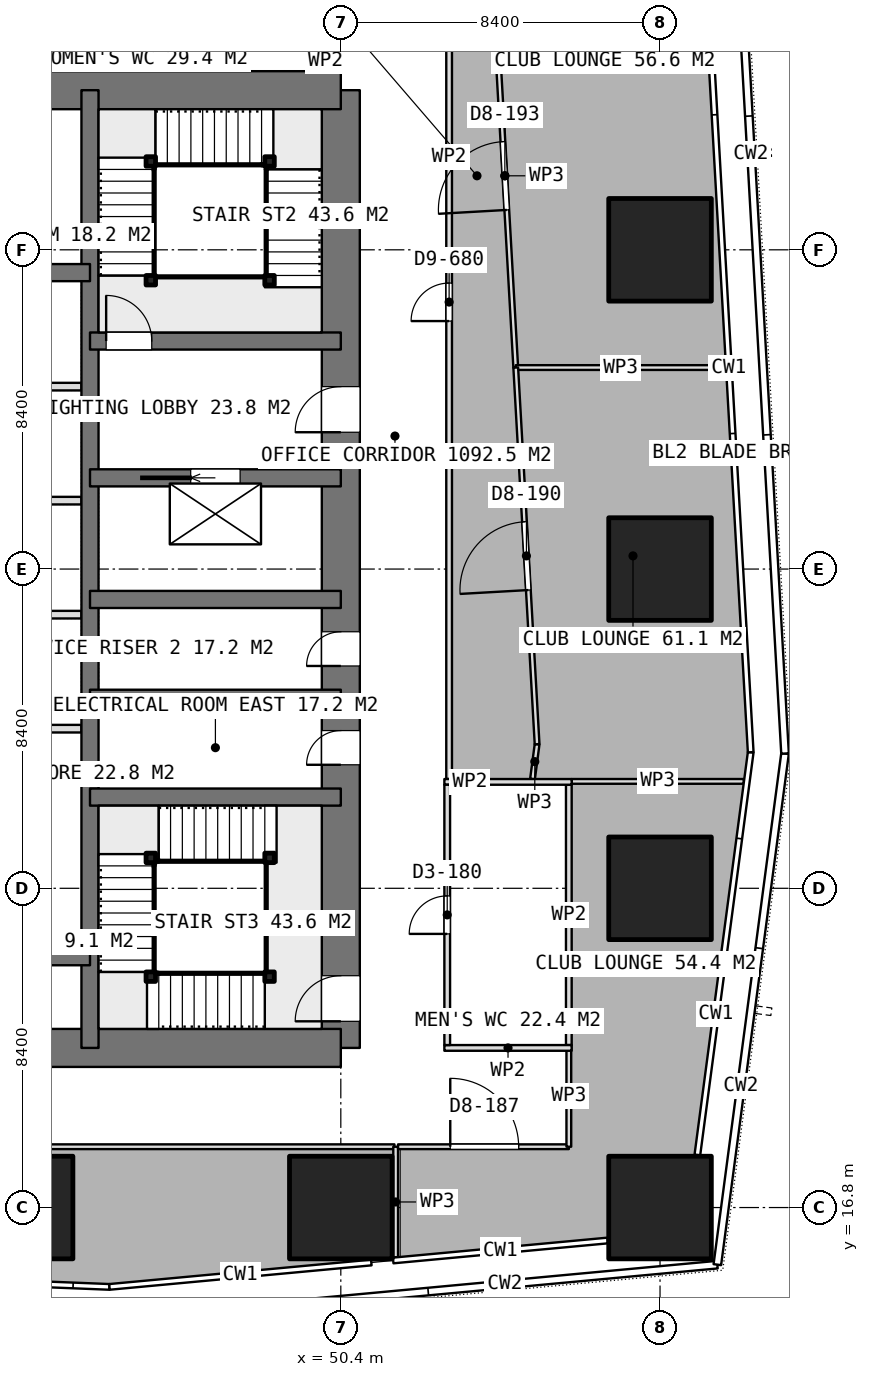
"""IFC4 building model, lengths in metres.
Left out: names, types, materials, properties, quantities, classifications, styles, units other than length and angle.
Written with IfcOpenShell. Run it as: python <this file> out.ifc"""

import sys

from ifc_helpers import new_model, si_unit, direction, frame, frame_2d, origin, origin_2d, place, context, subcontext, project, spatial, rectangle, extrude, element, fill, save


model = new_model("IFC4")
c1 = context("Model", 3, precision=1e-05, world=origin(), true_north=direction((0.0, 1.0)))
c2 = subcontext(c1, "Body", "Model", "MODEL_VIEW")
j1 = project(units=[si_unit("LENGTHUNIT", "METRE"), si_unit("PLANEANGLEUNIT", "RADIAN")], contexts=[c1])
p1 = place(None, origin())
s1 = spatial("IfcSite", under=j1, at=p1, CompositionType="ELEMENT")
p2 = place(p1, origin())
s2 = spatial("IfcBuilding", under=s1, at=p2, CompositionType="ELEMENT")
p3 = place(p2, frame((0.0, 0.0, 172.7)))
s3 = spatial("IfcBuildingStorey", under=s2, at=p3, CompositionType="ELEMENT", Elevation=172.7)
for number, where, z_axis, x_axis in (
    (1, (40.0, 21.0, 0.0), (0.0, 0.0, 1.0), (1.0, 0.0, 0.0)),
    (2, (40.0, 46.2, 0.0), (0.0, 0.0, 1.0), (1.0, 0.0, 0.0)),
):
    element("IfcWall", number, at=place(p3, frame(where, z_axis=z_axis, x_axis=x_axis)), inside=s3, PredefinedType="SHEAR", context=c2, shape_type="SweptSolid", body=[
        extrude(rectangle(XDim=10.4, YDim=1.0, at=frame_2d((5.2, 0.0))), origin(), (0.0, 0.0, 1.0), 3.75),
    ])
p4 = place(p3, frame((50.4, 21.0, 0.0), z_axis=(0.0, 0.0, 1.0), x_axis=(0.0, 1.0, 0.0)))
e3 = element("IfcWall", 3, at=p4, inside=s3, PredefinedType="SHEAR", context=c2, shape_type="SweptSolid", body=[
    extrude(rectangle(XDim=25.2, YDim=1.0, at=frame_2d((12.6, 0.0))), origin(), (0.0, 0.0, 1.0), 3.75),
])
p5 = place(p4, frame((16.2, 0.0, 0.0)))
e4 = element("IfcOpeningElement", 4, at=p5, cuts=e3, PredefinedType="OPENING", context=c2, shape_type="SweptSolid", body=[
    extrude(rectangle(XDim=1.2, YDim=2.1, at=frame_2d((0.6, 1.05))), frame((0.0, 0.51, 0.0), z_axis=(0.0, -1.0, 0.0), x_axis=(1.0, 0.0, 0.0)), (0.0, 0.0, 1.0), 1.02),
])
p6 = place(p4, frame((10.05, 0.0, 0.0)))
e5 = element("IfcOpeningElement", 5, at=p6, cuts=e3, PredefinedType="OPENING", context=c2, shape_type="SweptSolid", body=[
    extrude(rectangle(XDim=0.9, YDim=2.1, at=frame_2d((0.45, 1.05))), frame((0.0, 0.51, 0.0), z_axis=(0.0, -1.0, 0.0), x_axis=(1.0, 0.0, 0.0)), (0.0, 0.0, 1.0), 1.02),
])
p7 = place(p4, frame((7.45, 0.0, 0.0)))
e6 = element("IfcOpeningElement", 6, at=p7, cuts=e3, PredefinedType="OPENING", context=c2, shape_type="SweptSolid", body=[
    extrude(rectangle(XDim=0.9, YDim=2.1, at=frame_2d((0.45, 1.05))), frame((0.0, 0.51, 0.0), z_axis=(0.0, -1.0, 0.0), x_axis=(1.0, 0.0, 0.0)), (0.0, 0.0, 1.0), 1.02),
])
p8 = place(p4, frame((0.7, 0.0, 0.0)))
e7 = element("IfcOpeningElement", 7, at=p8, cuts=e3, PredefinedType="OPENING", context=c2, shape_type="SweptSolid", body=[
    extrude(rectangle(XDim=1.2, YDim=2.1, at=frame_2d((0.6, 1.05))), frame((0.0, 0.51, 0.0), z_axis=(0.0, -1.0, 0.0), x_axis=(1.0, 0.0, 0.0)), (0.0, 0.0, 1.0), 1.02),
])
p9 = place(p3, frame((43.8, 21.0, 0.0), z_axis=(0.0, 0.0, 1.0), x_axis=(0.0, 1.0, 0.0)))
e8 = element("IfcWall", 8, at=p9, inside=s3, PredefinedType="SHEAR", context=c2, shape_type="SweptSolid", body=[
    extrude(rectangle(XDim=25.2, YDim=0.45, at=frame_2d((12.6, 0.0))), origin(), (0.0, 0.0, 1.0), 3.75),
])
for number, where, z_axis, x_axis in (
    (9, (40.0, 23.4, 0.0), (0.0, 0.0, 1.0), (1.0, 0.0, 0.0)),
    (10, (40.0, 41.4, 0.0), (0.0, 0.0, 1.0), (1.0, 0.0, 0.0)),
):
    element("IfcWall", number, at=place(p3, frame(where, z_axis=z_axis, x_axis=x_axis)), inside=s3, PredefinedType="SHEAR", context=c2, shape_type="SweptSolid", body=[
        extrude(rectangle(XDim=3.8, YDim=0.45, at=frame_2d((1.9, 0.0))), origin(), (0.0, 0.0, 1.0), 3.75),
    ])
for number, where, z_axis, x_axis in (
    (11, (43.8, 27.6, 0.0), (0.0, 0.0, 1.0), (1.0, 0.0, 0.0)),
    (12, (43.8, 30.2, 0.0), (0.0, 0.0, 1.0), (1.0, 0.0, 0.0)),
    (13, (43.8, 32.8, 0.0), (0.0, 0.0, 1.0), (1.0, 0.0, 0.0)),
):
    element("IfcWall", number, at=place(p3, frame(where, z_axis=z_axis, x_axis=x_axis)), inside=s3, PredefinedType="SHEAR", context=c2, shape_type="SweptSolid", body=[
        extrude(rectangle(XDim=6.6, YDim=0.45, at=frame_2d((3.3, 0.0))), origin(), (0.0, 0.0, 1.0), 3.75),
    ])
p10 = place(p3, frame((43.8, 36.0, 0.0), z_axis=(0.0, 0.0, 1.0), x_axis=(1.0, 0.0, 0.0)))
e14 = element("IfcWall", 14, at=p10, inside=s3, PredefinedType="SHEAR", context=c2, shape_type="SweptSolid", body=[
    extrude(rectangle(XDim=6.6, YDim=0.45, at=frame_2d((3.3, 0.0))), origin(), (0.0, 0.0, 1.0), 3.75),
])
p11 = place(p10, frame((2.65, 0.0, 0.0)))
e15 = element("IfcOpeningElement", 15, at=p11, cuts=e14, PredefinedType="OPENING", context=c2, shape_type="SweptSolid", body=[
    extrude(rectangle(XDim=1.3, YDim=2.1, at=frame_2d((0.65, 1.05))), frame((0.0, 0.235, 0.0), z_axis=(0.0, -1.0, 0.0), x_axis=(1.0, 0.0, 0.0)), (0.0, 0.0, 1.0), 0.47),
])
p12 = place(p3, frame((43.8, 39.6, 0.0), z_axis=(0.0, 0.0, 1.0), x_axis=(1.0, 0.0, 0.0)))
e16 = element("IfcWall", 16, at=p12, inside=s3, PredefinedType="SHEAR", context=c2, shape_type="SweptSolid", body=[
    extrude(rectangle(XDim=6.6, YDim=0.45, at=frame_2d((3.3, 0.0))), origin(), (0.0, 0.0, 1.0), 3.75),
])
p13 = place(p12, frame((0.425, 0.0, 0.0)))
e17 = element("IfcOpeningElement", 17, at=p13, cuts=e16, PredefinedType="OPENING", context=c2, shape_type="SweptSolid", body=[
    extrude(rectangle(XDim=1.2, YDim=2.1, at=frame_2d((0.6, 1.05))), frame((0.0, 0.235, 0.0), z_axis=(0.0, -1.0, 0.0), x_axis=(1.0, 0.0, 0.0)), (0.0, 0.0, 1.0), 0.47),
])
for number, where, z_axis, x_axis in (
    (18, (42.0, 16.8, 0.0), (0.0, 0.0, 1.0), (1.0, 0.0, 0.0)),
    (19, (50.4, 16.8, 0.0), (0.0, 0.0, 1.0), (1.0, 0.0, 0.0)),
    (20, (58.8, 16.8, 0.0), (0.0, 0.0, 1.0), (1.0, 0.0, 0.0)),
    (21, (58.8, 25.2, 0.0), (0.0, 0.0, 1.0), (1.0, 0.0, 0.0)),
    (22, (58.8, 33.6, 0.0), (0.0, 0.0, 1.0), (1.0, 0.0, 0.0)),
    (23, (58.8, 42.0, 0.0), (0.0, 0.0, 1.0), (1.0, 0.0, 0.0)),
):
    element("IfcColumn", number, at=place(p3, frame(where, z_axis=z_axis, x_axis=x_axis)), inside=s3, PredefinedType="COLUMN", context=c2, shape_type="SweptSolid", body=[
        extrude(rectangle(XDim=2.7, YDim=2.7, at=origin_2d()), origin(), (0.0, 0.0, 1.0), 3.75),
    ])
for number, where, z_axis, x_axis in (
    (24, (40.5, 29.4, 0.0), (0.0, 0.0, 1.0), (1.0, 0.0, 0.0)),
    (25, (40.5, 32.4, 0.0), (0.0, 0.0, 1.0), (1.0, 0.0, 0.0)),
    (26, (40.5, 35.4, 0.0), (0.0, 0.0, 1.0), (1.0, 0.0, 0.0)),
    (27, (40.5, 38.4, 0.0), (0.0, 0.0, 1.0), (1.0, 0.0, 0.0)),
):
    element("IfcWall", number, at=place(p3, frame(where, z_axis=z_axis, x_axis=x_axis)), inside=s3, PredefinedType="PARTITIONING", context=c2, shape_type="SweptSolid", body=[
        extrude(rectangle(XDim=3.075, YDim=0.2, at=frame_2d((1.538, 0.0))), origin(), (0.0, 0.0, 1.0), 3.5),
    ])
p14 = place(p3, frame((50.0, 46.7, 0.0), z_axis=(0.0, 0.0, 1.0), x_axis=(0.0, 1.0, 0.0)))
e28 = element("IfcWall", 28, at=p14, inside=s3, PredefinedType="PARTITIONING", context=c2, shape_type="SweptSolid", body=[
    extrude(rectangle(XDim=2.625, YDim=0.15, at=frame_2d((1.312, 0.0))), origin(), (0.0, 0.0, 1.0), 3.5),
])
for number, where, z_axis, x_axis in (
    (29, (53.125, 21.0, 0.0), (0.0, 0.0, 1.0), (1.0, 0.0, 0.0)),
    (30, (53.125, 28.0, 0.0), (0.0, 0.0, 1.0), (1.0, 0.0, 0.0)),
):
    element("IfcWall", number, at=place(p3, frame(where, z_axis=z_axis, x_axis=x_axis)), inside=s3, PredefinedType="PARTITIONING", context=c2, shape_type="SweptSolid", body=[
        extrude(rectangle(XDim=3.35, YDim=0.15, at=frame_2d((1.675, 0.0))), origin(), (0.0, 0.0, 1.0), 3.5),
    ])
p15 = place(p3, frame((53.2, 21.075, 0.0), z_axis=(0.0, 0.0, 1.0), x_axis=(0.0, 1.0, 0.0)))
e31 = element("IfcWall", 31, at=p15, inside=s3, PredefinedType="PARTITIONING", context=c2, shape_type="SweptSolid", body=[
    extrude(rectangle(XDim=6.85, YDim=0.15, at=frame_2d((3.425, 0.0))), origin(), (0.0, 0.0, 1.0), 3.5),
])
p16 = place(p15, frame((2.925, 0.0, 0.0)))
e32 = element("IfcOpeningElement", 32, at=p16, cuts=e31, PredefinedType="OPENING", context=c2, shape_type="SweptSolid", body=[
    extrude(rectangle(XDim=1.0, YDim=2.1, at=frame_2d((0.5, 1.05))), frame((0.0, 0.085, 0.0), z_axis=(0.0, -1.0, 0.0), x_axis=(1.0, 0.0, 0.0)), (0.0, 0.0, 1.0), 0.17),
])
p17 = place(p3, frame((56.4, 21.075, 0.0), z_axis=(0.0, 0.0, 1.0), x_axis=(0.0, 1.0, 0.0)))
e33 = element("IfcWall", 33, at=p17, inside=s3, PredefinedType="PARTITIONING", context=c2, shape_type="SweptSolid", body=[
    extrude(rectangle(XDim=6.85, YDim=0.15, at=frame_2d((3.425, 0.0))), origin(), (0.0, 0.0, 1.0), 3.5),
])
p18 = place(p3, frame((23.793, 18.4, 0.0), z_axis=(0.0, 0.0, 1.0), x_axis=(1.0, 0.0, 0.0)))
e34 = element("IfcWall", 34, at=p18, inside=s3, PredefinedType="PARTITIONING", context=c2, shape_type="SweptSolid", body=[
    extrude(rectangle(XDim=28.018, YDim=0.125, at=frame_2d((14.009, 0.0))), origin(), (0.0, 0.0, 1.0), 3.5),
])
p19 = place(p18, frame((13.109, 0.0, 0.0)))
e35 = element("IfcOpeningElement", 35, at=p19, cuts=e34, PredefinedType="OPENING", context=c2, shape_type="SweptSolid", body=[
    extrude(rectangle(XDim=1.8, YDim=2.1, at=frame_2d((0.9, 1.05))), frame((0.0, 0.073, 0.0), z_axis=(0.0, -1.0, 0.0), x_axis=(1.0, 0.0, 0.0)), (0.0, 0.0, 1.0), 0.145),
])
p20 = place(p3, frame((51.843, 18.4, 0.0), z_axis=(0.0, 0.0, 1.0), x_axis=(0.0, -1.0, 0.0)))
e36 = element("IfcWall", 36, at=p20, inside=s3, PredefinedType="PARTITIONING", context=c2, shape_type="SweptSolid", body=[
    extrude(rectangle(XDim=2.907, YDim=0.125, at=frame_2d((1.454, 0.0))), origin(), (0.0, 0.0, 1.0), 3.5),
])
p21 = place(p3, frame((51.906, 18.4, 0.0), z_axis=(0.0, 0.0, 1.0), x_axis=(1.0, 0.0, 0.0)))
e37 = element("IfcWall", 37, at=p21, inside=s3, PredefinedType="PARTITIONING", context=c2, shape_type="SweptSolid", body=[
    extrude(rectangle(XDim=4.494, YDim=0.125, at=frame_2d((2.247, 0.0))), origin(), (0.0, 0.0, 1.0), 3.5),
])
p22 = place(p21, frame((1.374, 0.0, 0.0)))
e38 = element("IfcOpeningElement", 38, at=p22, cuts=e37, PredefinedType="OPENING", context=c2, shape_type="SweptSolid", body=[
    extrude(rectangle(XDim=1.8, YDim=2.1, at=frame_2d((0.9, 1.05))), frame((0.0, 0.073, 0.0), z_axis=(0.0, -1.0, 0.0), x_axis=(1.0, 0.0, 0.0)), (0.0, 0.0, 1.0), 0.145),
])
p23 = place(p3, frame((56.4, 18.4, 0.0), z_axis=(0.0, 0.0, 1.0), x_axis=(0.0, 1.0, 0.0)))
e39 = element("IfcWall", 39, at=p23, inside=s3, PredefinedType="PARTITIONING", context=c2, shape_type="SweptSolid", body=[
    extrude(rectangle(XDim=2.675, YDim=0.125, at=frame_2d((1.337, 0.0))), origin(), (0.0, 0.0, 1.0), 3.5),
])
p24 = place(p3, frame((56.476, 28.013, 0.0), z_axis=(0.0, 0.0, 1.0), x_axis=(1.0, 0.0, 0.0)))
e40 = element("IfcWall", 40, at=p24, inside=s3, PredefinedType="PARTITIONING", context=c2, shape_type="SweptSolid", body=[
    extrude(rectangle(XDim=4.528, YDim=0.125, at=frame_2d((2.264, 0.0))), origin(), (0.0, 0.0, 1.0), 3.5),
])
p25 = place(p3, frame((55.003, 38.902, 0.0), z_axis=(0.0, 0.0, 1.0), x_axis=(1.0, 0.0, 0.0)))
e41 = element("IfcWall", 41, at=p25, inside=s3, PredefinedType="PARTITIONING", context=c2, shape_type="SweptSolid", body=[
    extrude(rectangle(XDim=5.528, YDim=0.125, at=frame_2d((2.764, 0.0))), origin(), (0.0, 0.0, 1.0), 3.5),
])
p26 = place(p3, frame((55.444, 28.075, 0.0), z_axis=(0.0, 0.0, 1.0), x_axis=(0.130796265387, 0.991409268144, 0.0)))
e42 = element("IfcWall", 42, at=p26, inside=s3, PredefinedType="PARTITIONING", context=c2, shape_type="SweptSolid", body=[
    extrude(rectangle(XDim=0.924, YDim=0.125, at=frame_2d((0.462, 0.0))), origin(), (0.0, 0.0, 1.0), 3.5),
])
p27 = place(p3, frame((55.565, 28.991, 0.0), z_axis=(0.0, 0.0, 1.0), x_axis=(-0.056614146669, 0.998396133004, 0.0)))
e43 = element("IfcWall", 43, at=p27, inside=s3, PredefinedType="PARTITIONING", context=c2, shape_type="SweptSolid", body=[
    extrude(rectangle(XDim=9.927, YDim=0.125, at=frame_2d((4.963, 0.0))), origin(), (0.0, 0.0, 1.0), 3.5),
])
p28 = place(p27, frame((4.063, 0.0, 0.0)))
e44 = element("IfcOpeningElement", 44, at=p28, cuts=e43, PredefinedType="OPENING", context=c2, shape_type="SweptSolid", body=[
    extrude(rectangle(XDim=1.8, YDim=2.1, at=frame_2d((0.9, 1.05))), frame((0.0, 0.073, 0.0), z_axis=(0.0, -1.0, 0.0), x_axis=(1.0, 0.0, 0.0)), (0.0, 0.0, 1.0), 0.145),
])
p29 = place(p3, frame((55.003, 38.903, 0.0), z_axis=(0.0, 0.0, 1.0), x_axis=(-0.056703702353, 0.998391050711, 0.0)))
e45 = element("IfcWall", 45, at=p29, inside=s3, PredefinedType="PARTITIONING", context=c2, shape_type="SweptSolid", body=[
    extrude(rectangle(XDim=10.105, YDim=0.125, at=frame_2d((5.053, 0.0))), origin(), (0.0, 0.0, 1.0), 3.5),
])
p30 = place(p29, frame((4.153, 0.0, 0.0)))
e46 = element("IfcOpeningElement", 46, at=p30, cuts=e45, PredefinedType="OPENING", context=c2, shape_type="SweptSolid", body=[
    extrude(rectangle(XDim=1.8, YDim=2.1, at=frame_2d((0.9, 1.05))), frame((0.0, 0.073, 0.0), z_axis=(0.0, -1.0, 0.0), x_axis=(1.0, 0.0, 0.0)), (0.0, 0.0, 1.0), 0.145),
])
p31 = place(p3, frame((53.25, 28.075, 0.0), z_axis=(0.0, 0.0, 1.0), x_axis=(0.0, 1.0, 0.0)))
e47 = element("IfcWall", 47, at=p31, inside=s3, PredefinedType="PARTITIONING", context=c2, shape_type="SweptSolid", body=[
    extrude(rectangle(XDim=25.175, YDim=0.15, at=frame_2d((12.587, 0.0))), origin(), (0.0, 0.0, 1.0), 3.5),
])
p32 = place(p31, frame((12.05, 0.0, 0.0)))
e48 = element("IfcOpeningElement", 48, at=p32, cuts=e47, PredefinedType="OPENING", context=c2, shape_type="SweptSolid", body=[
    extrude(rectangle(XDim=1.0, YDim=2.1, at=frame_2d((0.5, 1.05))), frame((0.0, 0.085, 0.0), z_axis=(0.0, -1.0, 0.0), x_axis=(1.0, 0.0, 0.0)), (0.0, 0.0, 1.0), 0.17),
])
for number, where, z_axis, x_axis in (
    (49, (45.4, 41.2, 0.0), (0.0, 0.0, 1.0), (1.0, 0.0, 0.0)),
    (50, (45.4, 44.325, 0.0), (0.0, 0.0, 1.0), (1.0, 0.0, 0.0)),
    (51, (48.525, 44.325, 0.0), (0.0, 0.0, 1.0), (1.0, 0.0, 0.0)),
    (52, (48.525, 41.2, 0.0), (0.0, 0.0, 1.0), (1.0, 0.0, 0.0)),
    (53, (48.525, 22.875, 0.0), (0.0, 0.0, 1.0), (1.0, 0.0, 0.0)),
    (54, (45.4, 22.875, 0.0), (0.0, 0.0, 1.0), (1.0, 0.0, 0.0)),
    (55, (45.4, 26.0, 0.0), (0.0, 0.0, 1.0), (1.0, 0.0, 0.0)),
    (56, (48.525, 26.0, 0.0), (0.0, 0.0, 1.0), (1.0, 0.0, 0.0)),
):
    element("IfcColumn", number, at=place(p3, frame(where, z_axis=z_axis, x_axis=x_axis)), inside=s3, PredefinedType="COLUMN", context=c2, shape_type="SweptSolid", body=[
        extrude(rectangle(XDim=0.25, YDim=0.25, at=origin_2d()), origin(), (0.0, 0.0, 1.0), 3.75),
    ])
p33 = place(p5, origin())
e57 = element("IfcDoor", 57, at=p33, inside=s3, OperationType="SINGLE_SWING_LEFT", PredefinedType="DOOR", context=c2, shape_type="SweptSolid", body=[
    extrude(rectangle(XDim=1.2, YDim=2.1, at=frame_2d((0.6, 1.05))), frame((0.0, 0.025, 0.0), z_axis=(0.0, -1.0, 0.0), x_axis=(1.0, 0.0, 0.0)), (0.0, 0.0, 1.0), 0.05),
])
fill(e4, e57)
p34 = place(p6, origin())
e58 = element("IfcDoor", 58, at=p34, inside=s3, OperationType="SINGLE_SWING_LEFT", PredefinedType="DOOR", context=c2, shape_type="SweptSolid", body=[
    extrude(rectangle(XDim=0.9, YDim=2.1, at=frame_2d((0.45, 1.05))), frame((0.0, 0.025, 0.0), z_axis=(0.0, -1.0, 0.0), x_axis=(1.0, 0.0, 0.0)), (0.0, 0.0, 1.0), 0.05),
])
fill(e5, e58)
p35 = place(p7, origin())
e59 = element("IfcDoor", 59, at=p35, inside=s3, OperationType="SINGLE_SWING_LEFT", PredefinedType="DOOR", context=c2, shape_type="SweptSolid", body=[
    extrude(rectangle(XDim=0.9, YDim=2.1, at=frame_2d((0.45, 1.05))), frame((0.0, 0.025, 0.0), z_axis=(0.0, -1.0, 0.0), x_axis=(1.0, 0.0, 0.0)), (0.0, 0.0, 1.0), 0.05),
])
fill(e6, e59)
p36 = place(p11, origin())
e60 = element("IfcDoor", 60, at=p36, inside=s3, OperationType="SLIDING_TO_LEFT", PredefinedType="USERDEFINED", context=c2, shape_type="SweptSolid", body=[
    extrude(rectangle(XDim=1.3, YDim=2.1, at=frame_2d((0.65, 1.05))), frame((0.0, 0.025, 0.0), z_axis=(0.0, -1.0, 0.0), x_axis=(1.0, 0.0, 0.0)), (0.0, 0.0, 1.0), 0.05),
])
fill(e15, e60)
p37 = place(p16, origin())
e61 = element("IfcDoor", 61, at=p37, inside=s3, OperationType="SINGLE_SWING_LEFT", PredefinedType="DOOR", context=c2, shape_type="SweptSolid", body=[
    extrude(rectangle(XDim=1.0, YDim=2.1, at=frame_2d((0.5, 1.05))), frame((0.0, 0.025, 0.0), z_axis=(0.0, -1.0, 0.0), x_axis=(1.0, 0.0, 0.0)), (0.0, 0.0, 1.0), 0.05),
])
fill(e32, e61)
p38 = place(p22, origin())
e62 = element("IfcDoor", 62, at=p38, inside=s3, OperationType="DOUBLE_DOOR_SINGLE_SWING", PredefinedType="DOOR", context=c2, shape_type="SweptSolid", body=[
    extrude(rectangle(XDim=1.8, YDim=2.1, at=frame_2d((0.9, 1.05))), frame((0.0, 0.025, 0.0), z_axis=(0.0, -1.0, 0.0), x_axis=(1.0, 0.0, 0.0)), (0.0, 0.0, 1.0), 0.05),
])
fill(e38, e62)
p39 = place(p28, origin())
e63 = element("IfcDoor", 63, at=p39, inside=s3, OperationType="DOUBLE_DOOR_SINGLE_SWING", PredefinedType="DOOR", context=c2, shape_type="SweptSolid", body=[
    extrude(rectangle(XDim=1.8, YDim=2.1, at=frame_2d((0.9, 1.05))), frame((0.0, 0.025, 0.0), z_axis=(0.0, -1.0, 0.0), x_axis=(1.0, 0.0, 0.0)), (0.0, 0.0, 1.0), 0.05),
])
fill(e44, e63)
p40 = place(p30, origin())
e64 = element("IfcDoor", 64, at=p40, inside=s3, OperationType="DOUBLE_DOOR_SINGLE_SWING", PredefinedType="DOOR", context=c2, shape_type="SweptSolid", body=[
    extrude(rectangle(XDim=1.8, YDim=2.1, at=frame_2d((0.9, 1.05))), frame((0.0, 0.025, 0.0), z_axis=(0.0, -1.0, 0.0), x_axis=(1.0, 0.0, 0.0)), (0.0, 0.0, 1.0), 0.05),
])
fill(e46, e64)
p41 = place(p32, origin())
e65 = element("IfcDoor", 65, at=p41, inside=s3, OperationType="SINGLE_SWING_LEFT", PredefinedType="DOOR", context=c2, shape_type="SweptSolid", body=[
    extrude(rectangle(XDim=1.0, YDim=2.1, at=frame_2d((0.5, 1.05))), frame((0.0, 0.025, 0.0), z_axis=(0.0, -1.0, 0.0), x_axis=(1.0, 0.0, 0.0)), (0.0, 0.0, 1.0), 0.05),
])
fill(e48, e65)
p42 = place(p13, origin())
e66 = element("IfcDoor", 66, at=p42, inside=s3, OperationType="SINGLE_SWING_RIGHT", PredefinedType="DOOR", context=c2, shape_type="SweptSolid", body=[
    extrude(rectangle(XDim=1.2, YDim=2.1, at=frame_2d((0.6, 1.05))), frame((0.0, 0.025, 0.0), z_axis=(0.0, -1.0, 0.0), x_axis=(1.0, 0.0, 0.0)), (0.0, 0.0, 1.0), 0.05),
])
fill(e17, e66)
p43 = place(p8, origin())
e67 = element("IfcDoor", 67, at=p43, inside=s3, OperationType="SINGLE_SWING_RIGHT", PredefinedType="DOOR", context=c2, shape_type="SweptSolid", body=[
    extrude(rectangle(XDim=1.2, YDim=2.1, at=frame_2d((0.6, 1.05))), frame((0.0, 0.025, 0.0), z_axis=(0.0, -1.0, 0.0), x_axis=(1.0, 0.0, 0.0)), (0.0, 0.0, 1.0), 0.05),
])
fill(e7, e67)
save(model, sys.argv[1])
